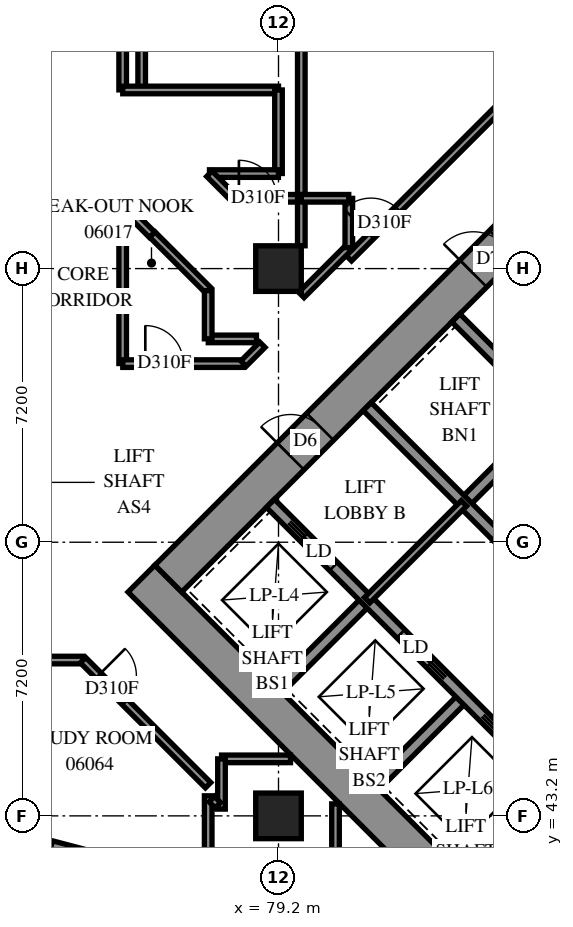
"""IFC4 building model, lengths in metres.
Left out: names, types, materials, properties, quantities, classifications, styles, units other than length and angle.
Written with IfcOpenShell. Run it as: python <this file> out.ifc"""

import sys

from ifc_helpers import new_model, si_unit, direction, frame, frame_2d, origin, origin_2d, place, context, subcontext, project, spatial, polyline, rectangle, outline, extrude, element, fill, save


model = new_model("IFC4")
c1 = context("Model", 3, precision=1e-05, world=origin(), true_north=direction((0.0, 1.0)))
c2 = subcontext(c1, "Body", "Model", "MODEL_VIEW")
j1 = project(units=[si_unit("LENGTHUNIT", "METRE"), si_unit("PLANEANGLEUNIT", "RADIAN")], contexts=[c1])
p1 = place(None, origin())
s1 = spatial("IfcSite", under=j1, at=p1, CompositionType="ELEMENT")
p2 = place(p1, origin())
s2 = spatial("IfcBuilding", under=s1, at=p2, CompositionType="ELEMENT")
p3 = place(p2, frame((0.0, 0.0, 27.0)))
s3 = spatial("IfcBuildingStorey", under=s2, at=p3, CompositionType="ELEMENT", Elevation=27.0)
for number, where, z_axis, x_axis in (
    (1, (79.2, 43.2, 0.0), (0.0, 0.0, 1.0), (1.0, 0.0, 0.0)),
    (2, (79.2, 57.6, 0.0), (0.0, 0.0, 1.0), (1.0, 0.0, 0.0)),
):
    element("IfcColumn", number, at=place(p3, frame(where, z_axis=z_axis, x_axis=x_axis)), inside=s3, PredefinedType="COLUMN", context=c2, shape_type="SweptSolid", body=[
        extrude(rectangle(XDim=1.2, YDim=1.2, at=origin_2d()), origin(), (0.0, 0.0, 1.0), 3.1),
    ])
p4 = place(p3, frame((75.594, 49.443, -0.3), z_axis=(0.0, 0.0, 1.0), x_axis=(0.7071037324, -0.70710983, 0.0)))
e3 = element("IfcWall", 3, at=p4, inside=s3, PredefinedType="SHEAR", context=c2, shape_type="SweptSolid", body=[
    extrude(rectangle(XDim=16.4, YDim=1.0, at=frame_2d((8.2, 0.0))), origin(), (0.0, 0.0, 1.0), 2.7),
])
p5 = place(p3, frame((76.301, 49.443, -0.3), z_axis=(0.0, 0.0, 1.0), x_axis=(0.7071067812, 0.7071067812, 0.0)))
e4 = element("IfcWall", 4, at=p5, inside=s3, PredefinedType="SHEAR", context=c2, shape_type="SweptSolid", body=[
    extrude(rectangle(XDim=14.4, YDim=1.0, at=frame_2d((7.2, 0.0))), origin(), (0.0, 0.0, 1.0), 2.7),
])
p6 = place(p5, frame((4.55, 0.0, 0.3)))
e5 = element("IfcOpeningElement", 5, at=p6, cuts=e4, PredefinedType="OPENING", context=c2, shape_type="SweptSolid", body=[
    extrude(rectangle(XDim=1.1, YDim=2.1, at=frame_2d((0.55, 1.05))), frame((0.0, 0.51, 0.0), z_axis=(0.0, -1.0, 0.0), x_axis=(1.0, 0.0, 0.0)), (0.0, 0.0, 1.0), 1.02),
])
p7 = place(p5, frame((11.35, 0.0, 0.3)))
e6 = element("IfcOpeningElement", 6, at=p7, cuts=e4, PredefinedType="OPENING", context=c2, shape_type="SweptSolid", body=[
    extrude(rectangle(XDim=1.1, YDim=2.1, at=frame_2d((0.55, 1.05))), frame((0.0, 0.51, 0.0), z_axis=(0.0, -1.0, 0.0), x_axis=(1.0, 0.0, 0.0)), (0.0, 0.0, 1.0), 1.02),
])
for number, where, z_axis, x_axis in (
    (7, (79.2, 46.544, 0.0), (0.0, 0.0, 1.0), (0.707, 0.707, 0.0)),
    (8, (84.079, 51.423, 0.0), (0.0, 0.0, 1.0), (0.707, 0.707, 0.0)),
):
    element("IfcWall", number, at=place(p3, frame(where, z_axis=z_axis, x_axis=x_axis)), inside=s3, PredefinedType="SOLIDWALL", context=c2, shape_type="SweptSolid", body=[
        extrude(rectangle(XDim=3.3, YDim=0.3, at=frame_2d((1.65, 0.0))), origin(), (0.0, 0.0, 1.0), 3.1),
    ])
for number, where, z_axis, x_axis in (
    (9, (81.746, 43.999, 0.0), (0.0, 0.0, 1.0), (0.707, 0.707, 0.0)),
    (10, (84.291, 41.453, 0.0), (0.0, 0.0, 1.0), (0.707, 0.707, 0.0)),
):
    element("IfcWall", number, at=place(p3, frame(where, z_axis=z_axis, x_axis=x_axis)), inside=s3, PredefinedType="SOLIDWALL", context=c2, shape_type="SweptSolid", body=[
        extrude(rectangle(XDim=3.3, YDim=0.3, at=frame_2d((1.65, 0.0))), origin(), (0.0, 0.0, 1.0), 3.1),
    ])
p8 = place(p3, frame((78.988, 51.423, 0.0), z_axis=(0.0, 0.0, 1.0), x_axis=(0.7071067812, -0.7071067812, 0.0)))
e11 = element("IfcWall", 11, at=p8, inside=s3, PredefinedType="SOLIDWALL", context=c2, shape_type="SweptSolid", body=[
    extrude(rectangle(XDim=14.4, YDim=0.3, at=frame_2d((7.2, 0.0))), origin(), (0.0, 0.0, 1.0), 3.1),
])
p9 = place(p8, frame((1.25, 0.0, 0.0)))
e12 = element("IfcOpeningElement", 12, at=p9, cuts=e11, PredefinedType="OPENING", context=c2, shape_type="SweptSolid", body=[
    extrude(rectangle(XDim=1.1, YDim=2.1, at=frame_2d((0.55, 1.05))), frame((0.0, 0.16, 0.0), z_axis=(0.0, -1.0, 0.0), x_axis=(1.0, 0.0, 0.0)), (0.0, 0.0, 1.0), 0.32),
])
p10 = place(p8, frame((4.85, 0.0, 0.0)))
e13 = element("IfcOpeningElement", 13, at=p10, cuts=e11, PredefinedType="OPENING", context=c2, shape_type="SweptSolid", body=[
    extrude(rectangle(XDim=1.1, YDim=2.1, at=frame_2d((0.55, 1.05))), frame((0.0, 0.16, 0.0), z_axis=(0.0, -1.0, 0.0), x_axis=(1.0, 0.0, 0.0)), (0.0, 0.0, 1.0), 0.32),
])
p11 = place(p8, frame((8.45, 0.0, 0.0)))
e14 = element("IfcOpeningElement", 14, at=p11, cuts=e11, PredefinedType="OPENING", context=c2, shape_type="SweptSolid", body=[
    extrude(rectangle(XDim=1.1, YDim=2.1, at=frame_2d((0.55, 1.05))), frame((0.0, 0.16, 0.0), z_axis=(0.0, -1.0, 0.0), x_axis=(1.0, 0.0, 0.0)), (0.0, 0.0, 1.0), 0.32),
])
p12 = place(p8, frame((12.05, 0.0, 0.0)))
e15 = element("IfcOpeningElement", 15, at=p12, cuts=e11, PredefinedType="OPENING", context=c2, shape_type="SweptSolid", body=[
    extrude(rectangle(XDim=1.1, YDim=2.1, at=frame_2d((0.55, 1.05))), frame((0.0, 0.16, 0.0), z_axis=(0.0, -1.0, 0.0), x_axis=(1.0, 0.0, 0.0)), (0.0, 0.0, 1.0), 0.32),
])
p13 = place(p3, frame((81.534, 53.969, 0.0), z_axis=(0.0, 0.0, 1.0), x_axis=(0.707103309, -0.7071102534, 0.0)))
e16 = element("IfcWall", 16, at=p13, inside=s3, PredefinedType="SOLIDWALL", context=c2, shape_type="SweptSolid", body=[
    extrude(rectangle(XDim=14.4, YDim=0.3, at=frame_2d((7.2, 0.0))), origin(), (0.0, 0.0, 1.0), 3.1),
])
p14 = place(p13, frame((12.05, 0.0, 0.0)))
e17 = element("IfcOpeningElement", 17, at=p14, cuts=e16, PredefinedType="OPENING", context=c2, shape_type="SweptSolid", body=[
    extrude(rectangle(XDim=1.1, YDim=2.1, at=frame_2d((0.55, 1.05))), frame((0.0, 0.16, 0.0), z_axis=(0.0, -1.0, 0.0), x_axis=(1.0, 0.0, 0.0)), (0.0, 0.0, 1.0), 0.32),
])
p15 = place(p3, frame((83.867, 56.302, 0.0), z_axis=(0.0, 0.0, 1.0), x_axis=(0.7071137256, -0.7070998367, 0.0)))
e18 = element("IfcWall", 18, at=p15, inside=s3, PredefinedType="SOLIDWALL", context=c2, shape_type="SweptSolid", body=[
    extrude(rectangle(XDim=7.2, YDim=0.3, at=frame_2d((3.6, 0.0))), origin(), (0.0, 0.0, 1.0), 3.1),
])
p16 = place(p3, frame((73.184, 42.278, 0.0), z_axis=(0.0, 0.0, 1.0), x_axis=(0.9671305585, -0.2542803232, 0.0)))
e19 = element("IfcWall", 19, at=p16, inside=s3, PredefinedType="SOLIDWALL", context=c2, shape_type="SweptSolid", body=[
    extrude(outline(polyline([(0.048, -0.275), (3.587, -0.275), (3.67, 0.275), (-0.048, 0.275), (0.048, -0.275)])), origin(), (0.0, 0.0, 1.0), 3.1),
])
p17 = place(p16, frame((0.749, 0.0, 0.5)))
e20 = element("IfcOpeningElement", 20, at=p17, cuts=e19, PredefinedType="OPENING", context=c2, shape_type="SweptSolid", body=[
    extrude(rectangle(XDim=1.2, YDim=2.45, at=frame_2d((0.6, 1.225))), frame((0.0, 0.285, 0.0), z_axis=(0.0, -1.0, 0.0), x_axis=(1.0, 0.0, 0.0)), (0.0, 0.0, 1.0), 0.57),
])
p18 = place(p3, frame((81.534, 48.878, 0.0), z_axis=(0.0, 0.0, 1.0), x_axis=(0.707092892, 0.7071206701, 0.0)))
e21 = element("IfcWall", 21, at=p18, inside=s3, PredefinedType="PARTITIONING", context=c2, shape_type="SweptSolid", body=[
    extrude(rectangle(XDim=3.6, YDim=0.2, at=frame_2d((1.8, 0.0))), origin(), (0.0, 0.0, 1.0), 3.1),
])
p19 = place(p3, frame((54.5, 47.3, 0.0), z_axis=(0.0, 0.0, 1.0), x_axis=(1.0, 0.0, 0.0)))
e22 = element("IfcWall", 22, at=p19, inside=s3, PredefinedType="PARTITIONING", context=c2, shape_type="SweptSolid", body=[
    extrude(rectangle(XDim=19.56, YDim=0.2, at=frame_2d((9.78, 0.0))), origin(), (0.0, 0.0, 1.0), 3.1),
])
p20 = place(p19, frame((0.243, 0.0, 0.0)))
e23 = element("IfcOpeningElement", 23, at=p20, cuts=e22, PredefinedType="OPENING", context=c2, shape_type="SweptSolid", body=[
    extrude(rectangle(XDim=1.0, YDim=2.1, at=frame_2d((0.5, 1.05))), frame((0.0, 0.11, 0.0), z_axis=(0.0, -1.0, 0.0), x_axis=(1.0, 0.0, 0.0)), (0.0, 0.0, 1.0), 0.22),
])
p21 = place(p19, frame((5.4, 0.0, 0.0)))
e24 = element("IfcOpeningElement", 24, at=p21, cuts=e22, PredefinedType="OPENING", context=c2, shape_type="SweptSolid", body=[
    extrude(rectangle(XDim=0.9, YDim=2.1, at=frame_2d((0.45, 1.05))), frame((0.0, 0.11, 0.0), z_axis=(0.0, -1.0, 0.0), x_axis=(1.0, 0.0, 0.0)), (0.0, 0.0, 1.0), 0.22),
])
p22 = place(p19, frame((7.1, 0.0, 0.0)))
e25 = element("IfcOpeningElement", 25, at=p22, cuts=e22, PredefinedType="OPENING", context=c2, shape_type="SweptSolid", body=[
    extrude(rectangle(XDim=0.9, YDim=2.1, at=frame_2d((0.45, 1.05))), frame((0.0, 0.11, 0.0), z_axis=(0.0, -1.0, 0.0), x_axis=(1.0, 0.0, 0.0)), (0.0, 0.0, 1.0), 0.22),
])
p23 = place(p19, frame((12.6, 0.0, 0.0)))
e26 = element("IfcOpeningElement", 26, at=p23, cuts=e22, PredefinedType="OPENING", context=c2, shape_type="SweptSolid", body=[
    extrude(rectangle(XDim=0.9, YDim=2.1, at=frame_2d((0.45, 1.05))), frame((0.0, 0.11, 0.0), z_axis=(0.0, -1.0, 0.0), x_axis=(1.0, 0.0, 0.0)), (0.0, 0.0, 1.0), 0.22),
])
p24 = place(p19, frame((14.3, 0.0, 0.0)))
e27 = element("IfcOpeningElement", 27, at=p24, cuts=e22, PredefinedType="OPENING", context=c2, shape_type="SweptSolid", body=[
    extrude(rectangle(XDim=0.9, YDim=2.1, at=frame_2d((0.45, 1.05))), frame((0.0, 0.11, 0.0), z_axis=(0.0, -1.0, 0.0), x_axis=(1.0, 0.0, 0.0)), (0.0, 0.0, 1.0), 0.22),
])
p25 = place(p3, frame((75.6, 62.3, 0.0), z_axis=(0.0, 0.0, 1.0), x_axis=(0.0, 1.0, 0.0)))
e28 = element("IfcWall", 28, at=p25, inside=s3, PredefinedType="PARTITIONING", context=c2, shape_type="SweptSolid", body=[
    extrude(rectangle(XDim=10.402, YDim=0.2, at=frame_2d((5.201, 0.0))), origin(), (0.0, 0.0, 1.0), 3.1),
])
p26 = place(p3, frame((81.052, 57.873, 0.0), z_axis=(0.0, 0.0, 1.0), x_axis=(0.7071067812, 0.7071067812, 0.0)))
e29 = element("IfcWall", 29, at=p26, inside=s3, PredefinedType="PARTITIONING", context=c2, shape_type="SweptSolid", body=[
    extrude(rectangle(XDim=8.18, YDim=0.2, at=frame_2d((4.09, 0.0))), origin(), (0.0, 0.0, 1.0), 3.1),
])
p27 = place(p26, frame((0.823, 0.0, 0.0)))
e30 = element("IfcOpeningElement", 30, at=p27, cuts=e29, PredefinedType="OPENING", context=c2, shape_type="SweptSolid", body=[
    extrude(rectangle(XDim=1.0, YDim=2.1, at=frame_2d((0.5, 1.05))), frame((0.0, 0.11, 0.0), z_axis=(0.0, -1.0, 0.0), x_axis=(1.0, 0.0, 0.0)), (0.0, 0.0, 1.0), 0.22),
])
p28 = place(p3, frame((75.1, 62.302, 0.0), z_axis=(0.0, 0.0, 1.0), x_axis=(0.0, 1.0, 0.0)))
e31 = element("IfcWall", 31, at=p28, inside=s3, PredefinedType="PARTITIONING", context=c2, shape_type="SweptSolid", body=[
    extrude(rectangle(XDim=5.598, YDim=0.2, at=frame_2d((2.799, 0.0))), origin(), (0.0, 0.0, 1.0), 3.1),
])
p29 = place(p3, frame((79.8, 59.45, 0.0), z_axis=(0.0, 0.0, 1.0), x_axis=(0.0, 1.0, 0.0)))
e32 = element("IfcWall", 32, at=p29, inside=s3, PredefinedType="PARTITIONING", context=c2, shape_type="SweptSolid", body=[
    extrude(rectangle(XDim=4.75, YDim=0.2, at=frame_2d((2.375, 0.0))), origin(), (0.0, 0.0, 1.0), 3.1),
])
p30 = place(p3, frame((74.057, 47.297, 0.0), z_axis=(0.0, 0.0, 1.0), x_axis=(0.7071067812, -0.7071067812, 0.0)))
e33 = element("IfcWall", 33, at=p30, inside=s3, PredefinedType="PARTITIONING", context=c2, shape_type="SweptSolid", body=[
    extrude(rectangle(XDim=4.653, YDim=0.2, at=frame_2d((2.326, 0.0))), origin(), (0.0, 0.0, 1.0), 3.1),
])
p31 = place(p30, frame((0.57, 0.0, 0.0)))
e34 = element("IfcOpeningElement", 34, at=p31, cuts=e33, PredefinedType="OPENING", context=c2, shape_type="SweptSolid", body=[
    extrude(rectangle(XDim=1.0, YDim=2.1, at=frame_2d((0.5, 1.05))), frame((0.0, 0.11, 0.0), z_axis=(0.0, -1.0, 0.0), x_axis=(1.0, 0.0, 0.0)), (0.0, 0.0, 1.0), 0.22),
])
p32 = place(p3, frame((75.1, 55.102, 0.0), z_axis=(0.0, 0.0, 1.0), x_axis=(0.0, 1.0, 0.0)))
e35 = element("IfcWall", 35, at=p32, inside=s3, PredefinedType="PARTITIONING", context=c2, shape_type="SweptSolid", body=[
    extrude(rectangle(XDim=4.166, YDim=0.2, at=frame_2d((2.083, 0.0))), origin(), (0.0, 0.0, 1.0), 3.1),
])
p33 = place(p3, frame((75.102, 62.3, 0.0), z_axis=(0.0, 0.0, 1.0), x_axis=(1.0, 0.0, 0.0)))
e36 = element("IfcWall", 36, at=p33, inside=s3, PredefinedType="PARTITIONING", context=c2, shape_type="SweptSolid", body=[
    extrude(rectangle(XDim=4.098, YDim=0.2, at=frame_2d((2.049, 0.0))), origin(), (0.0, 0.0, 1.0), 3.1),
])
p34 = place(p3, frame((75.102, 55.1, 0.0), z_axis=(0.0, 0.0, 1.0), x_axis=(1.0, 0.0, 0.0)))
e37 = element("IfcWall", 37, at=p34, inside=s3, PredefinedType="PARTITIONING", context=c2, shape_type="SweptSolid", body=[
    extrude(rectangle(XDim=3.178, YDim=0.2, at=frame_2d((1.589, 0.0))), origin(), (0.0, 0.0, 1.0), 3.1),
])
p35 = place(p34, frame((0.594, 0.0, 0.0)))
e38 = element("IfcOpeningElement", 38, at=p35, cuts=e37, PredefinedType="OPENING", context=c2, shape_type="SweptSolid", body=[
    extrude(rectangle(XDim=1.0, YDim=2.1, at=frame_2d((0.5, 1.05))), frame((0.0, 0.11, 0.0), z_axis=(0.0, -1.0, 0.0), x_axis=(1.0, 0.0, 0.0)), (0.0, 0.0, 1.0), 0.22),
])
p36 = place(p3, frame((77.35, 41.27, 0.0), z_axis=(0.0, 0.0, 1.0), x_axis=(0.0, 1.0, 0.0)))
e39 = element("IfcWall", 39, at=p36, inside=s3, PredefinedType="PARTITIONING", context=c2, shape_type="SweptSolid", body=[
    extrude(rectangle(XDim=2.458, YDim=0.2, at=frame_2d((1.229, 0.0))), origin(), (0.0, 0.0, 1.0), 3.1),
])
p37 = place(p3, frame((79.2, 60.102, 0.0), z_axis=(0.0, 0.0, 1.0), x_axis=(0.0, 1.0, 0.0)))
e40 = element("IfcWall", 40, at=p37, inside=s3, PredefinedType="PARTITIONING", context=c2, shape_type="SweptSolid", body=[
    extrude(rectangle(XDim=2.198, YDim=0.2, at=frame_2d((1.099, 0.0))), origin(), (0.0, 0.0, 1.0), 3.1),
])
p38 = place(p3, frame((75.879, 58.497, 0.0), z_axis=(0.0, 0.0, 1.0), x_axis=(0.7075866635, -0.706626573, 0.0)))
e41 = element("IfcWall", 41, at=p38, inside=s3, PredefinedType="PARTITIONING", context=c2, shape_type="SweptSolid", body=[
    extrude(rectangle(XDim=2.083, YDim=0.2, at=frame_2d((1.042, 0.0))), origin(), (0.0, 0.0, 1.0), 3.1),
])
for number, where, z_axis, x_axis in (
    (42, (77.702, 44.7, 0.0), (0.0, 0.0, 1.0), (1.0, 0.0, 0.0)),
    (43, (80.7, 41.702, 0.0), (0.0, 0.0, 1.0), (0.0, 1.0, 0.0)),
    (44, (77.384, 60.1, 0.0), (0.0, 0.0, 1.0), (1.0, 0.0, 0.0)),
):
    element("IfcWall", number, at=place(p3, frame(where, z_axis=z_axis, x_axis=x_axis)), inside=s3, PredefinedType="PARTITIONING", context=c2, shape_type="SweptSolid", body=[
        extrude(rectangle(XDim=1.814, YDim=0.2, at=frame_2d((0.907, 0.0))), origin(), (0.0, 0.0, 1.0), 3.1),
    ])
p39 = place(p3, frame((78.032, 59.45, 0.0), z_axis=(0.0, 0.0, 1.0), x_axis=(1.0, 0.0, 0.0)))
e45 = element("IfcWall", 45, at=p39, inside=s3, PredefinedType="PARTITIONING", context=c2, shape_type="SweptSolid", body=[
    extrude(rectangle(XDim=1.768, YDim=0.2, at=frame_2d((0.884, 0.0))), origin(), (0.0, 0.0, 1.0), 3.1),
])
p40 = place(p39, frame((0.126, 0.0, 0.0)))
e46 = element("IfcOpeningElement", 46, at=p40, cuts=e45, PredefinedType="OPENING", context=c2, shape_type="SweptSolid", body=[
    extrude(rectangle(XDim=1.0, YDim=2.1, at=frame_2d((0.5, 1.05))), frame((0.0, 0.11, 0.0), z_axis=(0.0, -1.0, 0.0), x_axis=(1.0, 0.0, 0.0)), (0.0, 0.0, 1.0), 0.22),
])
p41 = place(p3, frame((79.801, 56.905, 0.0), z_axis=(0.0, 0.0, 1.0), x_axis=(0.7071067812, 0.7071067812, 0.0)))
e47 = element("IfcWall", 47, at=p41, inside=s3, PredefinedType="PARTITIONING", context=c2, shape_type="SweptSolid", body=[
    extrude(rectangle(XDim=1.765, YDim=0.2, at=frame_2d((0.882, 0.0))), origin(), (0.0, 0.0, 1.0), 3.1),
])
p42 = place(p3, frame((77.7, 43.378, 0.0), z_axis=(0.0, 0.0, 1.0), x_axis=(0.0, 1.0, 0.0)))
e48 = element("IfcWall", 48, at=p42, inside=s3, PredefinedType="PARTITIONING", context=c2, shape_type="SweptSolid", body=[
    extrude(rectangle(XDim=1.322, YDim=0.2, at=frame_2d((0.661, 0.0))), origin(), (0.0, 0.0, 1.0), 3.1),
])
p43 = place(p3, frame((81.05, 58.152, 0.0), z_axis=(0.0, 0.0, 1.0), x_axis=(0.0, 1.0, 0.0)))
e49 = element("IfcWall", 49, at=p43, inside=s3, PredefinedType="PARTITIONING", context=c2, shape_type="SweptSolid", body=[
    extrude(rectangle(XDim=1.296, YDim=0.2, at=frame_2d((0.648, 0.0))), origin(), (0.0, 0.0, 1.0), 3.1),
])
for number, where, z_axis, x_axis in (
    (50, (77.352, 55.75, 0.0), (0.0, 0.0, 1.0), (1.0, 0.0, 0.0)),
    (51, (77.35, 55.752, 0.0), (0.0, 0.0, 1.0), (0.0, 1.0, 0.0)),
):
    element("IfcWall", number, at=place(p3, frame(where, z_axis=z_axis, x_axis=x_axis)), inside=s3, PredefinedType="PARTITIONING", context=c2, shape_type="SweptSolid", body=[
        extrude(rectangle(XDim=1.268, YDim=0.2, at=frame_2d((0.634, 0.0))), origin(), (0.0, 0.0, 1.0), 3.1),
    ])
p44 = place(p3, frame((79.8, 58.2, 0.0), z_axis=(0.0, 0.0, 1.0), x_axis=(0.0, 1.0, 0.0)))
e52 = element("IfcWall", 52, at=p44, inside=s3, PredefinedType="PARTITIONING", context=c2, shape_type="SweptSolid", body=[
    extrude(rectangle(XDim=1.25, YDim=0.2, at=frame_2d((0.625, 0.0))), origin(), (0.0, 0.0, 1.0), 3.1),
])
p45 = place(p3, frame((79.8, 59.45, 0.0), z_axis=(0.0, 0.0, 1.0), x_axis=(1.0, 0.0, 0.0)))
e53 = element("IfcWall", 53, at=p45, inside=s3, PredefinedType="PARTITIONING", context=c2, shape_type="SweptSolid", body=[
    extrude(rectangle(XDim=1.248, YDim=0.2, at=frame_2d((0.624, 0.0))), origin(), (0.0, 0.0, 1.0), 3.1),
])
p46 = place(p3, frame((77.381, 60.095, 0.0), z_axis=(0.0, 0.0, 1.0), x_axis=(0.7071067812, -0.7071067812, 0.0)))
e54 = element("IfcWall", 54, at=p46, inside=s3, PredefinedType="PARTITIONING", context=c2, shape_type="SweptSolid", body=[
    extrude(rectangle(XDim=0.916, YDim=0.2, at=frame_2d((0.458, 0.0))), origin(), (0.0, 0.0, 1.0), 3.1),
])
p47 = place(p3, frame((75.297, 59.067, 0.0), z_axis=(0.0, 0.0, 1.0), x_axis=(0.7071067812, -0.7071067812, 0.0)))
e55 = element("IfcWall", 55, at=p47, inside=s3, PredefinedType="PARTITIONING", context=c2, shape_type="SweptSolid", body=[
    extrude(rectangle(XDim=0.815, YDim=0.2, at=frame_2d((0.407, 0.0))), origin(), (0.0, 0.0, 1.0), 3.1),
])
p48 = place(p3, frame((78.279, 55.1, 0.0), z_axis=(0.0, 0.0, 1.0), x_axis=(0.7071067812, 0.7071067812, 0.0)))
e56 = element("IfcWall", 56, at=p48, inside=s3, PredefinedType="PARTITIONING", context=c2, shape_type="SweptSolid", body=[
    extrude(rectangle(XDim=0.701, YDim=0.2, at=frame_2d((0.351, 0.0))), origin(), (0.0, 0.0, 1.0), 3.1),
])
p49 = place(p3, frame((77.445, 43.64, 0.0), z_axis=(0.0, 0.0, 1.0), x_axis=(0.7071067812, -0.7071067812, 0.0)))
e57 = element("IfcWall", 57, at=p49, inside=s3, PredefinedType="PARTITIONING", context=c2, shape_type="SweptSolid", body=[
    extrude(rectangle(XDim=0.225, YDim=0.2, at=frame_2d((0.113, 0.0))), origin(), (0.0, 0.0, 1.0), 3.1),
])
p50 = place(p6, origin())
e58 = element("IfcDoor", 58, at=p50, inside=s3, OperationType="DOUBLE_DOOR_SINGLE_SWING", PredefinedType="DOOR", context=c2, shape_type="SweptSolid", body=[
    extrude(rectangle(XDim=1.1, YDim=2.1, at=frame_2d((0.55, 1.05))), frame((0.0, 0.025, 0.0), z_axis=(0.0, -1.0, 0.0), x_axis=(1.0, 0.0, 0.0)), (0.0, 0.0, 1.0), 0.05),
])
fill(e5, e58)
p51 = place(p7, origin())
e59 = element("IfcDoor", 59, at=p51, inside=s3, OperationType="SINGLE_SWING_LEFT", PredefinedType="DOOR", context=c2, shape_type="SweptSolid", body=[
    extrude(rectangle(XDim=1.1, YDim=2.1, at=frame_2d((0.55, 1.05))), frame((0.0, 0.025, 0.0), z_axis=(0.0, -1.0, 0.0), x_axis=(1.0, 0.0, 0.0)), (0.0, 0.0, 1.0), 0.05),
])
fill(e6, e59)
p52 = place(p9, origin())
e60 = element("IfcDoor", 60, at=p52, inside=s3, OperationType="SLIDING_TO_LEFT", PredefinedType="DOOR", context=c2, shape_type="SweptSolid", body=[
    extrude(rectangle(XDim=1.1, YDim=2.1, at=frame_2d((0.55, 1.05))), frame((0.0, 0.025, 0.0), z_axis=(0.0, -1.0, 0.0), x_axis=(1.0, 0.0, 0.0)), (0.0, 0.0, 1.0), 0.05),
])
fill(e12, e60)
p53 = place(p10, origin())
e61 = element("IfcDoor", 61, at=p53, inside=s3, OperationType="SLIDING_TO_RIGHT", PredefinedType="DOOR", context=c2, shape_type="SweptSolid", body=[
    extrude(rectangle(XDim=1.1, YDim=2.1, at=frame_2d((0.55, 1.05))), frame((0.0, 0.025, 0.0), z_axis=(0.0, -1.0, 0.0), x_axis=(1.0, 0.0, 0.0)), (0.0, 0.0, 1.0), 0.05),
])
fill(e13, e61)
p54 = place(p35, origin())
e62 = element("IfcDoor", 62, at=p54, inside=s3, OperationType="SINGLE_SWING_LEFT", PredefinedType="DOOR", context=c2, shape_type="SweptSolid", body=[
    extrude(rectangle(XDim=1.0, YDim=2.1, at=frame_2d((0.5, 1.05))), frame((0.0, 0.025, 0.0), z_axis=(0.0, -1.0, 0.0), x_axis=(1.0, 0.0, 0.0)), (0.0, 0.0, 1.0), 0.05),
])
fill(e38, e62)
p55 = place(p31, origin())
e63 = element("IfcDoor", 63, at=p55, inside=s3, OperationType="SINGLE_SWING_LEFT", PredefinedType="DOOR", context=c2, shape_type="SweptSolid", body=[
    extrude(rectangle(XDim=1.0, YDim=2.1, at=frame_2d((0.5, 1.05))), frame((0.0, 0.025, 0.0), z_axis=(0.0, -1.0, 0.0), x_axis=(1.0, 0.0, 0.0)), (0.0, 0.0, 1.0), 0.05),
])
fill(e34, e63)
p56 = place(p40, origin())
e64 = element("IfcDoor", 64, at=p56, inside=s3, OperationType="SINGLE_SWING_LEFT", PredefinedType="DOOR", context=c2, shape_type="SweptSolid", body=[
    extrude(rectangle(XDim=1.0, YDim=2.1, at=frame_2d((0.5, 1.05))), frame((0.0, 0.025, 0.0), z_axis=(0.0, -1.0, 0.0), x_axis=(1.0, 0.0, 0.0)), (0.0, 0.0, 1.0), 0.05),
])
fill(e46, e64)
p57 = place(p27, origin())
e65 = element("IfcDoor", 65, at=p57, inside=s3, OperationType="SINGLE_SWING_RIGHT", PredefinedType="DOOR", context=c2, shape_type="SweptSolid", body=[
    extrude(rectangle(XDim=1.0, YDim=2.1, at=frame_2d((0.5, 1.05))), frame((0.0, 0.025, 0.0), z_axis=(0.0, -1.0, 0.0), x_axis=(1.0, 0.0, 0.0)), (0.0, 0.0, 1.0), 0.05),
])
fill(e30, e65)
save(model, sys.argv[1])
